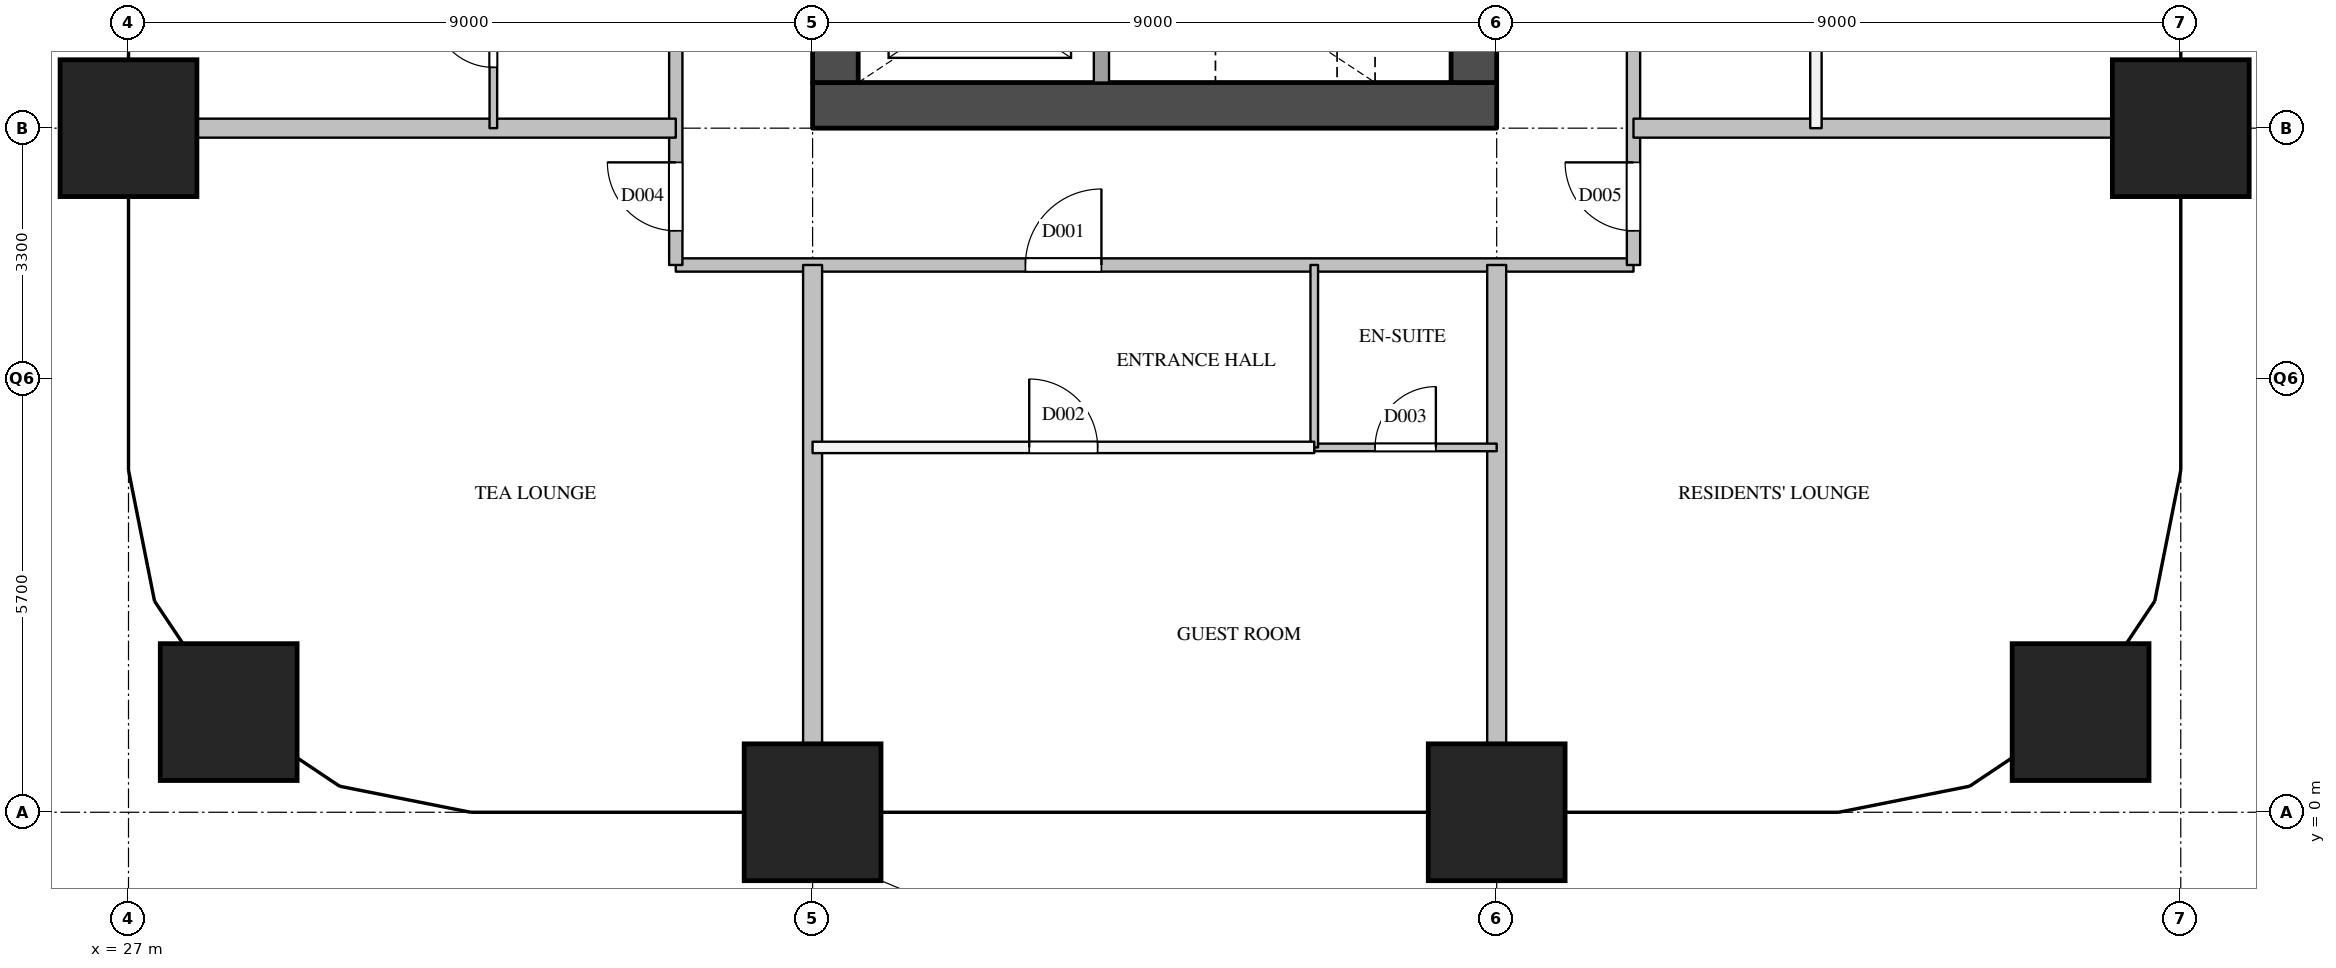
"""IFC4 building model, lengths in metres.
Left out: names, types, materials, properties, quantities, classifications, styles, units other than length and angle.
Written with IfcOpenShell. Run it as: python <this file> out.ifc"""

import sys

from ifc_helpers import new_model, si_unit, direction, frame, frame_2d, origin, origin_2d, place, context, subcontext, project, spatial, rectangle, extrude, element, fill, save


model = new_model("IFC4")
c1 = context("Model", 3, precision=1e-05, world=origin(), true_north=direction((0.0, 1.0)))
c2 = subcontext(c1, "Body", "Model", "MODEL_VIEW")
j1 = project(units=[si_unit("LENGTHUNIT", "METRE"), si_unit("PLANEANGLEUNIT", "RADIAN")], contexts=[c1])
p1 = place(None, origin())
s1 = spatial("IfcSite", under=j1, at=p1, CompositionType="ELEMENT")
p2 = place(p1, origin())
s2 = spatial("IfcBuilding", under=s1, at=p2, CompositionType="ELEMENT")
p3 = place(p2, frame((0.0, 0.0, 96.8)))
s3 = spatial("IfcBuildingStorey", under=s2, at=p3, CompositionType="ELEMENT", Elevation=96.8)
for number, where, z_axis, x_axis in (
    (1, (28.318, 1.318, 0.0), (0.0, 0.0, 1.0), (1.0, 0.0, 0.0)),
    (2, (27.0, 9.0, 0.0), (0.0, 0.0, 1.0), (1.0, 0.0, 0.0)),
    (3, (36.0, 0.0, 0.0), (0.0, 0.0, 1.0), (1.0, 0.0, 0.0)),
    (4, (45.0, 0.0, 0.0), (0.0, 0.0, 1.0), (1.0, 0.0, 0.0)),
    (5, (52.682, 1.318, 0.0), (0.0, 0.0, 1.0), (1.0, 0.0, 0.0)),
    (6, (54.0, 9.0, 0.0), (0.0, 0.0, 1.0), (1.0, 0.0, 0.0)),
):
    element("IfcColumn", number, at=place(p3, frame(where, z_axis=z_axis, x_axis=x_axis)), inside=s3, PredefinedType="COLUMN", context=c2, shape_type="SweptSolid", body=[
        extrude(rectangle(XDim=1.8, YDim=1.8, at=origin_2d()), origin(), (0.0, 0.0, 1.0), 3.8),
    ])
p4 = place(p3, frame((36.0, 9.3, 0.0), z_axis=(0.0, 0.0, 1.0), x_axis=(1.0, 0.0, 0.0)))
e7 = element("IfcWall", 7, at=p4, inside=s3, PredefinedType="SHEAR", context=c2, shape_type="SweptSolid", body=[
    extrude(rectangle(XDim=9.0, YDim=0.6, at=frame_2d((4.5, 0.0))), origin(), (0.0, 0.0, 1.0), 3.5),
])
p5 = place(p3, frame((36.3, 9.6, 0.0), z_axis=(0.0, 0.0, 1.0), x_axis=(0.0, 1.0, 0.0)))
e8 = element("IfcWall", 8, at=p5, inside=s3, PredefinedType="SHEAR", context=c2, shape_type="SweptSolid", body=[
    extrude(rectangle(XDim=12.3, YDim=0.6, at=frame_2d((6.15, 0.0))), origin(), (0.0, 0.0, 1.0), 3.5),
])
p6 = place(p5, frame((0.525, 0.0, 0.0)))
e9 = element("IfcOpeningElement", 9, at=p6, cuts=e8, PredefinedType="OPENING", context=c2, shape_type="SweptSolid", body=[
    extrude(rectangle(XDim=1.2, YDim=2.1, at=frame_2d((0.6, 1.05))), frame((0.0, 0.31, 0.0), z_axis=(0.0, -1.0, 0.0), x_axis=(1.0, 0.0, 0.0)), (0.0, 0.0, 1.0), 0.62),
])
p7 = place(p5, frame((4.8, 0.0, 0.0)))
e10 = element("IfcOpeningElement", 10, at=p7, cuts=e8, PredefinedType="OPENING", context=c2, shape_type="SweptSolid", body=[
    extrude(rectangle(XDim=1.0, YDim=2.1, at=frame_2d((0.5, 1.05))), frame((0.0, 0.31, 0.0), z_axis=(0.0, -1.0, 0.0), x_axis=(1.0, 0.0, 0.0)), (0.0, 0.0, 1.0), 0.62),
])
p8 = place(p3, frame((44.7, 9.6, 0.0), z_axis=(0.0, 0.0, 1.0), x_axis=(0.0, 1.0, 0.0)))
e11 = element("IfcWall", 11, at=p8, inside=s3, PredefinedType="SHEAR", context=c2, shape_type="SweptSolid", body=[
    extrude(rectangle(XDim=12.3, YDim=0.6, at=frame_2d((6.15, 0.0))), origin(), (0.0, 0.0, 1.0), 3.5),
])
p9 = place(p8, frame((0.8, 0.0, 0.0)))
e12 = element("IfcOpeningElement", 12, at=p9, cuts=e11, PredefinedType="OPENING", context=c2, shape_type="SweptSolid", body=[
    extrude(rectangle(XDim=0.7, YDim=2.1, at=frame_2d((0.35, 1.05))), frame((0.0, 0.31, 0.0), z_axis=(0.0, -1.0, 0.0), x_axis=(1.0, 0.0, 0.0)), (0.0, 0.0, 1.0), 0.62),
])
p10 = place(p3, frame((39.8, 9.6, 0.0), z_axis=(0.0, 0.0, 1.0), x_axis=(0.0, 1.0, 0.0)))
e13 = element("IfcWall", 13, at=p10, inside=s3, PredefinedType="SOLIDWALL", context=c2, shape_type="SweptSolid", body=[
    extrude(rectangle(XDim=2.3, YDim=0.2, at=frame_2d((1.15, 0.0))), origin(), (0.0, 0.0, 1.0), 3.5),
])
p11 = place(p3, frame((34.2, 7.2, 0.0), z_axis=(0.0, 0.0, 1.0), x_axis=(1.0, 0.0, 0.0)))
e14 = element("IfcWall", 14, at=p11, inside=s3, PredefinedType="PARTITIONING", context=c2, shape_type="SweptSolid", body=[
    extrude(rectangle(XDim=12.6, YDim=0.175, at=frame_2d((6.3, 0.0))), origin(), (0.0, 0.0, 1.0), 3.5),
])
p12 = place(p11, frame((4.6, 0.0, 0.0)))
e15 = element("IfcOpeningElement", 15, at=p12, cuts=e14, PredefinedType="OPENING", context=c2, shape_type="SweptSolid", body=[
    extrude(rectangle(XDim=1.0, YDim=2.1, at=frame_2d((0.5, 1.05))), frame((0.0, 0.097, 0.0), z_axis=(0.0, -1.0, 0.0), x_axis=(1.0, 0.0, 0.0)), (0.0, 0.0, 1.0), 0.195),
])
p13 = place(p3, frame((34.2, 7.2, 0.0), z_axis=(0.0, 0.0, 1.0), x_axis=(0.0, 1.0, 0.0)))
e16 = element("IfcWall", 16, at=p13, inside=s3, PredefinedType="PARTITIONING", context=c2, shape_type="SweptSolid", body=[
    extrude(rectangle(XDim=16.49, YDim=0.175, at=frame_2d((8.245, 0.0))), origin(), (0.0, 0.0, 1.0), 3.5),
])
p14 = place(p13, frame((0.45, 0.0, 0.0)))
e17 = element("IfcOpeningElement", 17, at=p14, cuts=e16, PredefinedType="OPENING", context=c2, shape_type="SweptSolid", body=[
    extrude(rectangle(XDim=0.9, YDim=2.1, at=frame_2d((0.45, 1.05))), frame((0.0, 0.097, 0.0), z_axis=(0.0, -1.0, 0.0), x_axis=(1.0, 0.0, 0.0)), (0.0, 0.0, 1.0), 0.195),
])
p15 = place(p13, frame((7.0, 0.0, 0.0)))
e18 = element("IfcOpeningElement", 18, at=p15, cuts=e16, PredefinedType="OPENING", context=c2, shape_type="SweptSolid", body=[
    extrude(rectangle(XDim=1.0, YDim=2.1, at=frame_2d((0.5, 1.05))), frame((0.0, 0.097, 0.0), z_axis=(0.0, -1.0, 0.0), x_axis=(1.0, 0.0, 0.0)), (0.0, 0.0, 1.0), 0.195),
])
p16 = place(p13, frame((14.345, 0.0, 0.0)))
e19 = element("IfcOpeningElement", 19, at=p16, cuts=e16, PredefinedType="OPENING", context=c2, shape_type="SweptSolid", body=[
    extrude(rectangle(XDim=1.0, YDim=2.1, at=frame_2d((0.5, 1.05))), frame((0.0, 0.097, 0.0), z_axis=(0.0, -1.0, 0.0), x_axis=(1.0, 0.0, 0.0)), (0.0, 0.0, 1.0), 0.195),
])
p17 = place(p3, frame((46.8, 7.2, 0.0), z_axis=(0.0, 0.0, 1.0), x_axis=(0.0, 1.0, 0.0)))
e20 = element("IfcWall", 20, at=p17, inside=s3, PredefinedType="PARTITIONING", context=c2, shape_type="SweptSolid", body=[
    extrude(rectangle(XDim=16.49, YDim=0.175, at=frame_2d((8.245, 0.0))), origin(), (0.0, 0.0, 1.0), 3.5),
])
p18 = place(p17, frame((0.45, 0.0, 0.0)))
e21 = element("IfcOpeningElement", 21, at=p18, cuts=e20, PredefinedType="OPENING", context=c2, shape_type="SweptSolid", body=[
    extrude(rectangle(XDim=0.9, YDim=2.1, at=frame_2d((0.45, 1.05))), frame((0.0, 0.097, 0.0), z_axis=(0.0, -1.0, 0.0), x_axis=(1.0, 0.0, 0.0)), (0.0, 0.0, 1.0), 0.195),
])
p19 = place(p17, frame((4.6, 0.0, 0.0)))
e22 = element("IfcOpeningElement", 22, at=p19, cuts=e20, PredefinedType="OPENING", context=c2, shape_type="SweptSolid", body=[
    extrude(rectangle(XDim=1.0, YDim=2.1, at=frame_2d((0.5, 1.05))), frame((0.0, 0.097, 0.0), z_axis=(0.0, -1.0, 0.0), x_axis=(1.0, 0.0, 0.0)), (0.0, 0.0, 1.0), 0.195),
])
p20 = place(p17, frame((11.35, 0.0, 0.0)))
e23 = element("IfcOpeningElement", 23, at=p20, cuts=e20, PredefinedType="OPENING", context=c2, shape_type="SweptSolid", body=[
    extrude(rectangle(XDim=1.0, YDim=2.1, at=frame_2d((0.5, 1.05))), frame((0.0, 0.097, 0.0), z_axis=(0.0, -1.0, 0.0), x_axis=(1.0, 0.0, 0.0)), (0.0, 0.0, 1.0), 0.195),
])
p21 = place(p3, frame((36.0, 4.8, 0.0), z_axis=(0.0, 0.0, 1.0), x_axis=(1.0, 0.0, 0.0)))
e24 = element("IfcWall", 24, at=p21, inside=s3, PredefinedType="PARTITIONING", context=c2, shape_type="SweptSolid", body=[
    extrude(rectangle(XDim=6.6, YDim=0.15, at=frame_2d((3.3, 0.0))), origin(), (0.0, 0.0, 1.0), 3.5),
])
p22 = place(p21, frame((2.85, 0.0, 0.0)))
e25 = element("IfcOpeningElement", 25, at=p22, cuts=e24, PredefinedType="OPENING", context=c2, shape_type="SweptSolid", body=[
    extrude(rectangle(XDim=0.9, YDim=2.1, at=frame_2d((0.45, 1.05))), frame((0.0, 0.085, 0.0), z_axis=(0.0, -1.0, 0.0), x_axis=(1.0, 0.0, 0.0)), (0.0, 0.0, 1.0), 0.17),
])
p23 = place(p3, frame((49.2, 9.0, 0.0), z_axis=(0.0, 0.0, 1.0), x_axis=(0.0, 1.0, 0.0)))
e26 = element("IfcWall", 26, at=p23, inside=s3, PredefinedType="PARTITIONING", context=c2, shape_type="SweptSolid", body=[
    extrude(rectangle(XDim=6.6, YDim=0.15, at=frame_2d((3.3, 0.0))), origin(), (0.0, 0.0, 1.0), 3.5),
])
p24 = place(p23, frame((2.85, 0.0, 0.0)))
e27 = element("IfcOpeningElement", 27, at=p24, cuts=e26, PredefinedType="OPENING", context=c2, shape_type="SweptSolid", body=[
    extrude(rectangle(XDim=0.9, YDim=2.1, at=frame_2d((0.45, 1.05))), frame((0.0, 0.085, 0.0), z_axis=(0.0, -1.0, 0.0), x_axis=(1.0, 0.0, 0.0)), (0.0, 0.0, 1.0), 0.17),
])
for number, where, z_axis, x_axis in (
    (28, (27.0, 9.0, 0.0), (0.0, 0.0, 1.0), (1.0, 0.0, 0.0)),
    (29, (46.8, 9.0, 0.0), (0.0, 0.0, 1.0), (1.0, 0.0, 0.0)),
    (30, (36.0, 0.0, 0.0), (0.0, 0.0, 1.0), (0.0, 1.0, 0.0)),
    (31, (45.0, 0.0, 0.0), (0.0, 0.0, 1.0), (0.0, 1.0, 0.0)),
):
    element("IfcWall", number, at=place(p3, frame(where, z_axis=z_axis, x_axis=x_axis)), inside=s3, PredefinedType="PARTITIONING", context=c2, shape_type="SweptSolid", body=[
        extrude(rectangle(XDim=7.2, YDim=0.25, at=frame_2d((3.6, 0.0))), origin(), (0.0, 0.0, 1.0), 3.5),
    ])
p25 = place(p3, frame((42.6, 4.8, 0.0), z_axis=(0.0, 0.0, 1.0), x_axis=(1.0, 0.0, 0.0)))
e32 = element("IfcWall", 32, at=p25, inside=s3, PredefinedType="PARTITIONING", context=c2, shape_type="SweptSolid", body=[
    extrude(rectangle(XDim=2.4, YDim=0.1, at=frame_2d((1.2, 0.0))), origin(), (0.0, 0.0, 1.0), 3.5),
])
p26 = place(p25, frame((0.8, 0.0, 0.0)))
e33 = element("IfcOpeningElement", 33, at=p26, cuts=e32, PredefinedType="OPENING", context=c2, shape_type="SweptSolid", body=[
    extrude(rectangle(XDim=0.8, YDim=2.1, at=frame_2d((0.4, 1.05))), frame((0.0, 0.06, 0.0), z_axis=(0.0, -1.0, 0.0), x_axis=(1.0, 0.0, 0.0)), (0.0, 0.0, 1.0), 0.12),
])
p27 = place(p3, frame((31.8, 9.0, 0.0), z_axis=(0.0, 0.0, 1.0), x_axis=(0.0, 1.0, 0.0)))
e34 = element("IfcWall", 34, at=p27, inside=s3, PredefinedType="PARTITIONING", context=c2, shape_type="SweptSolid", body=[
    extrude(rectangle(XDim=2.4, YDim=0.1, at=frame_2d((1.2, 0.0))), origin(), (0.0, 0.0, 1.0), 3.5),
])
p28 = place(p27, frame((0.8, 0.0, 0.0)))
e35 = element("IfcOpeningElement", 35, at=p28, cuts=e34, PredefinedType="OPENING", context=c2, shape_type="SweptSolid", body=[
    extrude(rectangle(XDim=0.8, YDim=2.1, at=frame_2d((0.4, 1.05))), frame((0.0, 0.06, 0.0), z_axis=(0.0, -1.0, 0.0), x_axis=(1.0, 0.0, 0.0)), (0.0, 0.0, 1.0), 0.12),
])
p29 = place(p3, frame((42.6, 4.8, 0.0), z_axis=(0.0, 0.0, 1.0), x_axis=(0.0, 1.0, 0.0)))
e36 = element("IfcWall", 36, at=p29, inside=s3, PredefinedType="PARTITIONING", context=c2, shape_type="SweptSolid", body=[
    extrude(rectangle(XDim=2.4, YDim=0.1, at=frame_2d((1.2, 0.0))), origin(), (0.0, 0.0, 1.0), 3.5),
])
p30 = place(p12, origin())
e37 = element("IfcDoor", 37, at=p30, inside=s3, OperationType="SINGLE_SWING_RIGHT", PredefinedType="DOOR", context=c2, shape_type="SweptSolid", body=[
    extrude(rectangle(XDim=1.0, YDim=2.1, at=frame_2d((0.5, 1.05))), frame((0.0, 0.025, 0.0), z_axis=(0.0, -1.0, 0.0), x_axis=(1.0, 0.0, 0.0)), (0.0, 0.0, 1.0), 0.05),
])
fill(e15, e37)
p31 = place(p22, origin())
e38 = element("IfcDoor", 38, at=p31, inside=s3, OperationType="SINGLE_SWING_LEFT", PredefinedType="DOOR", context=c2, shape_type="SweptSolid", body=[
    extrude(rectangle(XDim=0.9, YDim=2.1, at=frame_2d((0.45, 1.05))), frame((0.0, 0.025, 0.0), z_axis=(0.0, -1.0, 0.0), x_axis=(1.0, 0.0, 0.0)), (0.0, 0.0, 1.0), 0.05),
])
fill(e25, e38)
p32 = place(p26, origin())
e39 = element("IfcDoor", 39, at=p32, inside=s3, OperationType="SINGLE_SWING_RIGHT", PredefinedType="DOOR", context=c2, shape_type="SweptSolid", body=[
    extrude(rectangle(XDim=0.8, YDim=2.1, at=frame_2d((0.4, 1.05))), frame((0.0, 0.025, 0.0), z_axis=(0.0, -1.0, 0.0), x_axis=(1.0, 0.0, 0.0)), (0.0, 0.0, 1.0), 0.05),
])
fill(e33, e39)
p33 = place(p14, origin())
e40 = element("IfcDoor", 40, at=p33, inside=s3, OperationType="SINGLE_SWING_RIGHT", PredefinedType="DOOR", context=c2, shape_type="SweptSolid", body=[
    extrude(rectangle(XDim=0.9, YDim=2.1, at=frame_2d((0.45, 1.05))), frame((0.0, 0.025, 0.0), z_axis=(0.0, -1.0, 0.0), x_axis=(1.0, 0.0, 0.0)), (0.0, 0.0, 1.0), 0.05),
])
fill(e17, e40)
p34 = place(p18, origin())
e41 = element("IfcDoor", 41, at=p34, inside=s3, OperationType="SINGLE_SWING_RIGHT", PredefinedType="DOOR", context=c2, shape_type="SweptSolid", body=[
    extrude(rectangle(XDim=0.9, YDim=2.1, at=frame_2d((0.45, 1.05))), frame((0.0, 0.025, 0.0), z_axis=(0.0, -1.0, 0.0), x_axis=(1.0, 0.0, 0.0)), (0.0, 0.0, 1.0), 0.05),
])
fill(e21, e41)
p35 = place(p28, origin())
e42 = element("IfcDoor", 42, at=p35, inside=s3, OperationType="SINGLE_SWING_RIGHT", PredefinedType="DOOR", context=c2, shape_type="SweptSolid", body=[
    extrude(rectangle(XDim=0.8, YDim=2.1, at=frame_2d((0.4, 1.05))), frame((0.0, 0.025, 0.0), z_axis=(0.0, -1.0, 0.0), x_axis=(1.0, 0.0, 0.0)), (0.0, 0.0, 1.0), 0.05),
])
fill(e35, e42)
save(model, sys.argv[1])
